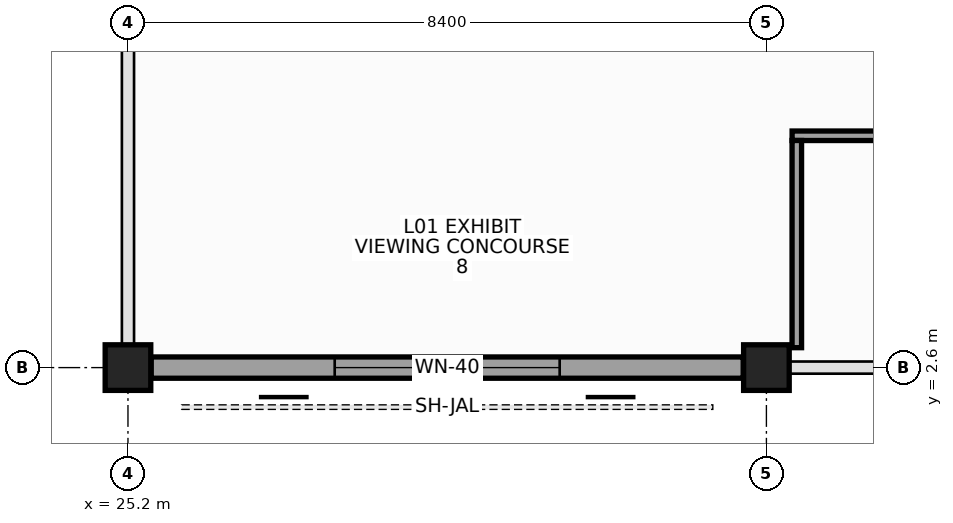
"""IFC4 building model, lengths in metres.
Left out: names, types, materials, properties, quantities, classifications, styles, units other than length and angle.
Written with IfcOpenShell. Run it as: python <this file> out.ifc"""

import sys

from ifc_helpers import new_model, si_unit, direction, frame, frame_2d, origin, origin_2d, place, context, subcontext, project, spatial, rectangle, extrude, element, fill, save


model = new_model("IFC4")
c1 = context("Model", 3, precision=1e-05, world=origin(), true_north=direction((0.0, 1.0)))
c2 = subcontext(c1, "Body", "Model", "MODEL_VIEW")
j1 = project(units=[si_unit("LENGTHUNIT", "METRE"), si_unit("PLANEANGLEUNIT", "RADIAN")], contexts=[c1])
p1 = place(None, origin())
s1 = spatial("IfcSite", under=j1, at=p1, CompositionType="ELEMENT")
p2 = place(p1, origin())
s2 = spatial("IfcBuilding", under=s1, at=p2, CompositionType="ELEMENT")
p3 = place(p2, frame((0.0, 0.0, 5.4)))
s3 = spatial("IfcBuildingStorey", under=s2, at=p3, CompositionType="ELEMENT", Elevation=5.4)
for number, where, z_axis, x_axis in (
    (1, (25.2, 2.6, 0.0), (0.0, 0.0, 1.0), (1.0, 0.0, 0.0)),
    (2, (33.6, 2.6, 0.0), (0.0, 0.0, 1.0), (1.0, 0.0, 0.0)),
):
    element("IfcColumn", number, at=place(p3, frame(where, z_axis=z_axis, x_axis=x_axis)), inside=s3, PredefinedType="COLUMN", context=c2, shape_type="SweptSolid", body=[
        extrude(rectangle(XDim=0.6, YDim=0.6, at=origin_2d()), origin(), (0.0, 0.0, 1.0), 5.4),
    ])
p4 = place(p3, frame((25.505, 2.6, 0.0), z_axis=(0.0, 0.0, 1.0), x_axis=(1.0, 0.0, 0.0)))
e3 = element("IfcWall", 3, at=p4, inside=s3, PredefinedType="STANDARD", context=c2, shape_type="SweptSolid", body=[
    extrude(rectangle(XDim=7.79, YDim=0.28, at=frame_2d((3.895, 0.0))), origin(), (0.0, 0.0, 1.0), 4.23),
])
p5 = place(p4, frame((2.415, 0.0, 0.95)))
e4 = element("IfcOpeningElement", 4, at=p5, cuts=e3, PredefinedType="OPENING", context=c2, shape_type="SweptSolid", body=[
    extrude(rectangle(XDim=2.96, YDim=2.16, at=frame_2d((1.48, 1.08))), frame((0.0, 0.15, 0.0), z_axis=(0.0, -1.0, 0.0), x_axis=(1.0, 0.0, 0.0)), (0.0, 0.0, 1.0), 0.3),
])
p6 = place(p3, frame((33.938, 5.65, 0.0), z_axis=(0.0, 0.0, 1.0), x_axis=(1.0, 0.0, 0.0)))
e5 = element("IfcWall", 5, at=p6, inside=s3, PredefinedType="PARTITIONING", context=c2, shape_type="SweptSolid", body=[
    extrude(rectangle(XDim=24.325, YDim=0.125, at=frame_2d((12.163, 0.0))), origin(), (0.0, 0.0, 1.0), 4.35),
])
p7 = place(p6, frame((11.282, 0.0, 0.0)))
e6 = element("IfcOpeningElement", 6, at=p7, cuts=e5, PredefinedType="OPENING", context=c2, shape_type="SweptSolid", body=[
    extrude(rectangle(XDim=1.76, YDim=2.45, at=frame_2d((0.88, 1.225))), frame((0.0, 0.073, 0.0), z_axis=(0.0, -1.0, 0.0), x_axis=(1.0, 0.0, 0.0)), (0.0, 0.0, 1.0), 0.145),
])
p8 = place(p6, frame((13.642, 0.0, 1.05)))
e7 = element("IfcOpeningElement", 7, at=p8, cuts=e5, PredefinedType="OPENING", context=c2, shape_type="SweptSolid", body=[
    extrude(rectangle(XDim=2.25, YDim=1.6, at=frame_2d((1.125, 0.8))), frame((0.0, 0.073, 0.0), z_axis=(0.0, -1.0, 0.0), x_axis=(1.0, 0.0, 0.0)), (0.0, 0.0, 1.0), 0.145),
])
p9 = place(p3, frame((34.0, 2.862, 0.0), z_axis=(0.0, 0.0, 1.0), x_axis=(0.0, 1.0, 0.0)))
e8 = element("IfcWall", 8, at=p9, inside=s3, PredefinedType="PARTITIONING", context=c2, shape_type="SweptSolid", body=[
    extrude(rectangle(XDim=2.726, YDim=0.125, at=frame_2d((1.363, 0.0))), origin(), (0.0, 0.0, 1.0), 4.23),
])
p10 = place(p5, origin())
e9 = element("IfcWindow", 9, at=p10, inside=s3, PartitioningType="SINGLE_PANEL", PredefinedType="WINDOW", context=c2, shape_type="SweptSolid", body=[
    extrude(rectangle(XDim=2.96, YDim=2.16, at=frame_2d((1.48, 1.08))), frame((0.0, 0.03, 0.0), z_axis=(0.0, -1.0, 0.0), x_axis=(1.0, 0.0, 0.0)), (0.0, 0.0, 1.0), 0.06),
])
fill(e4, e9)
save(model, sys.argv[1])
